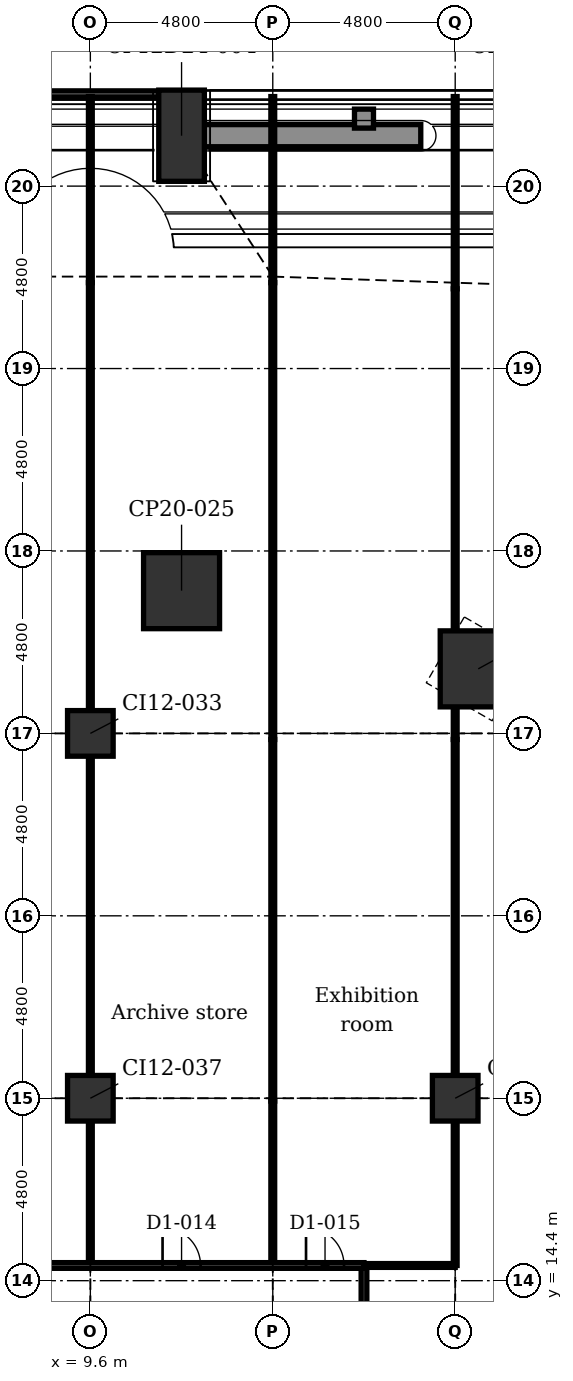
"""IFC4 building model, lengths in metres.
Left out: names, types, materials, properties, quantities, classifications, styles, units other than length and angle.
Written with IfcOpenShell. Run it as: python <this file> out.ifc"""

import sys

from ifc_helpers import new_model, si_unit, direction, frame, frame_2d, origin, origin_2d, place, context, subcontext, project, spatial, rectangle, extrude, element, fill, save


model = new_model("IFC4")
c1 = context("Model", 3, precision=1e-05, world=origin(), true_north=direction((0.0, 1.0)))
c2 = subcontext(c1, "Body", "Model", "MODEL_VIEW")
j1 = project(units=[si_unit("LENGTHUNIT", "METRE"), si_unit("PLANEANGLEUNIT", "RADIAN")], contexts=[c1])
p1 = place(None, origin())
s1 = spatial("IfcSite", under=j1, at=p1, CompositionType="ELEMENT")
p2 = place(p1, origin())
s2 = spatial("IfcBuilding", under=s1, at=p2, CompositionType="ELEMENT")
p3 = place(p2, frame((0.0, 0.0, 7.0)))
s3 = spatial("IfcBuildingStorey", under=s2, at=p3, CompositionType="ELEMENT", Elevation=7.0)
p4 = place(p3, frame((12.0, 44.526, -0.3), z_axis=(0.0, 0.0, 1.0), x_axis=(1.0, 0.0, 0.0)))
e1 = element("IfcColumn", 1, at=p4, inside=s3, PredefinedType="COLUMN", context=c2, shape_type="SweptSolid", body=[
    extrude(rectangle(XDim=1.2, YDim=2.4, at=origin_2d()), origin(), (0.0, 0.0, 1.0), 5.4),
])
for number, where, z_axis, x_axis in (
    (2, (12.0, 32.555, -0.3), (0.0, 0.0, 1.0), (1.0, 0.0, 0.0)),
    (3, (19.806, 30.498, -0.3), (0.0, 0.0, 1.0), (0.5, 0.866, 0.0)),
):
    element("IfcColumn", number, at=place(p3, frame(where, z_axis=z_axis, x_axis=x_axis)), inside=s3, PredefinedType="COLUMN", context=c2, shape_type="SweptSolid", body=[
        extrude(rectangle(XDim=2.0, YDim=2.0, at=origin_2d()), origin(), (0.0, 0.0, 1.0), 5.4),
    ])
for number, where, z_axis, x_axis in (
    (4, (9.6, 19.2, -0.3), (0.0, 0.0, 1.0), (1.0, 0.0, 0.0)),
    (5, (9.6, 28.8, -0.3), (0.0, 0.0, 1.0), (1.0, 0.0, 0.0)),
    (6, (19.2, 19.2, -0.3), (0.0, 0.0, 1.0), (1.0, 0.0, 0.0)),
):
    element("IfcColumn", number, at=place(p3, frame(where, z_axis=z_axis, x_axis=x_axis)), inside=s3, PredefinedType="COLUMN", context=c2, shape_type="SweptSolid", body=[
        extrude(rectangle(XDim=1.2, YDim=1.2, at=origin_2d()), origin(), (0.0, 0.0, 1.0), 5.4),
    ])
p5 = place(p3, frame((3.004, 45.626, 0.0), z_axis=(0.0, 0.0, 1.0), x_axis=(1.0, 0.0, 0.0)))
e7 = element("IfcWall", 7, at=p5, inside=s3, PredefinedType="PARTITIONING", context=c2, shape_type="SweptSolid", body=[
    extrude(rectangle(XDim=8.392, YDim=0.16, at=frame_2d((4.196, 0.0))), origin(), (0.0, 0.0, 1.0), 5.1),
])
p6 = place(p5, frame((2.996, 0.0, 0.0)))
e8 = element("IfcOpeningElement", 8, at=p6, cuts=e7, PredefinedType="OPENING", context=c2, shape_type="SweptSolid", body=[
    extrude(rectangle(XDim=2.4, YDim=2.4, at=frame_2d((1.2, 1.2))), frame((0.0, 0.09, 0.0), z_axis=(0.0, -1.0, 0.0), x_axis=(1.0, 0.0, 0.0)), (0.0, 0.0, 1.0), 0.18),
])
p7 = place(p3, frame((12.294, 44.526, 5.4), z_axis=(0.0, 0.0, 1.0), x_axis=(1.0, 0.0, 0.0)))
e9 = element("IfcWall", 9, at=p7, inside=s3, PredefinedType="USERDEFINED", context=c2, shape_type="SweptSolid", body=[
    extrude(rectangle(XDim=6.0, YDim=0.6, at=frame_2d((3.0, 0.0))), origin(), (0.0, 0.0, 1.0), 0.7),
])
p8 = place(p3, frame((16.55, 44.976, 0.0), z_axis=(0.0, 0.0, 1.0), x_axis=(1.0, 0.0, 0.0)))
e10 = element("IfcWall", 10, at=p8, inside=s3, PredefinedType="SOLIDWALL", context=c2, shape_type="SweptSolid", body=[
    extrude(rectangle(XDim=0.5, YDim=0.5, at=frame_2d((0.25, 0.0))), origin(), (0.0, 0.0, 1.0), 4.8),
])
p9 = place(p3, frame((19.2, 31.408, 0.0), z_axis=(0.0, 0.0, 1.0), x_axis=(0.0, 1.0, 0.0)))
e11 = element("IfcWall", 11, at=p9, inside=s3, PredefinedType="PARTITIONING", context=c2, shape_type="SweptSolid", body=[
    extrude(rectangle(XDim=9.09, YDim=0.1, at=frame_2d((4.545, 0.0))), origin(), (0.0, 0.0, 1.0), 4.643),
])
p10 = place(p3, frame((19.2, 14.8, 0.0), z_axis=(0.0, 0.0, 1.0), x_axis=(0.0, 1.0, 0.0)))
e12 = element("IfcWall", 12, at=p10, inside=s3, PredefinedType="PARTITIONING", context=c2, shape_type="SweptSolid", body=[
    extrude(rectangle(XDim=3.84, YDim=0.1, at=frame_2d((1.92, 0.0))), origin(), (0.0, 0.0, 1.0), 4.693),
])
p11 = place(p3, frame((19.2, 18.64, 0.0), z_axis=(0.0, 0.0, 1.0), x_axis=(0.0, 1.0, 0.0)))
e13 = element("IfcWall", 13, at=p11, inside=s3, PredefinedType="PARTITIONING", context=c2, shape_type="SweptSolid", body=[
    extrude(rectangle(XDim=1.12, YDim=0.1, at=frame_2d((0.56, 0.0))), origin(), (0.0, 0.0, 1.0), 5.1),
])
p12 = place(p3, frame((19.2, 19.76, 0.0), z_axis=(0.0, 0.0, 1.0), x_axis=(0.0, 1.0, 0.0)))
e14 = element("IfcWall", 14, at=p12, inside=s3, PredefinedType="PARTITIONING", context=c2, shape_type="SweptSolid", body=[
    extrude(rectangle(XDim=8.88, YDim=0.1, at=frame_2d((4.44, 0.0))), origin(), (0.0, 0.0, 1.0), 4.693),
])
p13 = place(p3, frame((19.2, 28.64, 0.0), z_axis=(0.0, 0.0, 1.0), x_axis=(0.0, 1.0, 0.0)))
e15 = element("IfcWall", 15, at=p13, inside=s3, PredefinedType="PARTITIONING", context=c2, shape_type="SweptSolid", body=[
    extrude(rectangle(XDim=2.769, YDim=0.1, at=frame_2d((1.384, 0.0))), origin(), (0.0, 0.0, 1.0), 5.1),
])
p14 = place(p3, frame((19.2, 40.498, 0.0), z_axis=(0.0, 0.0, 1.0), x_axis=(0.0, 1.0, 0.0)))
e16 = element("IfcWall", 16, at=p14, inside=s3, PredefinedType="PARTITIONING", context=c2, shape_type="SweptSolid", body=[
    extrude(rectangle(XDim=5.058, YDim=0.1, at=frame_2d((2.529, 0.0))), origin(), (0.0, 0.0, 1.0), 5.1),
])
p15 = place(p3, frame((16.8, 3.95, 0.0), z_axis=(0.0, 0.0, 1.0), x_axis=(0.0, 1.0, 0.0)))
e17 = element("IfcWall", 17, at=p15, inside=s3, PredefinedType="PARTITIONING", context=c2, shape_type="SweptSolid", body=[
    extrude(rectangle(XDim=10.85, YDim=0.15, at=frame_2d((5.425, 0.0))), origin(), (0.0, 0.0, 1.0), 5.1),
])
p16 = place(p15, frame((2.45, 0.0, 0.0)))
e18 = element("IfcOpeningElement", 18, at=p16, cuts=e17, PredefinedType="OPENING", context=c2, shape_type="SweptSolid", body=[
    extrude(rectangle(XDim=1.0, YDim=2.1, at=frame_2d((0.5, 1.05))), frame((0.0, 0.085, 0.0), z_axis=(0.0, -1.0, 0.0), x_axis=(1.0, 0.0, 0.0)), (0.0, 0.0, 1.0), 0.17),
])
p17 = place(p15, frame((7.95, 0.0, 0.0)))
e19 = element("IfcOpeningElement", 19, at=p17, cuts=e17, PredefinedType="OPENING", context=c2, shape_type="SweptSolid", body=[
    extrude(rectangle(XDim=1.0, YDim=2.1, at=frame_2d((0.5, 1.05))), frame((0.0, 0.085, 0.0), z_axis=(0.0, -1.0, 0.0), x_axis=(1.0, 0.0, 0.0)), (0.0, 0.0, 1.0), 0.17),
])
p18 = place(p3, frame((14.4, 28.64, 0.0), z_axis=(0.0, 0.0, 1.0), x_axis=(0.0, 1.0, 0.0)))
e20 = element("IfcWall", 20, at=p18, inside=s3, PredefinedType="PARTITIONING", context=c2, shape_type="SweptSolid", body=[
    extrude(rectangle(XDim=12.019, YDim=0.1, at=frame_2d((6.01, 0.0))), origin(), (0.0, 0.0, 1.0), 4.567),
])
p19 = place(p3, frame((14.4, 14.8, 0.0), z_axis=(0.0, 0.0, 1.0), x_axis=(0.0, 1.0, 0.0)))
e21 = element("IfcWall", 21, at=p19, inside=s3, PredefinedType="PARTITIONING", context=c2, shape_type="SweptSolid", body=[
    extrude(rectangle(XDim=4.326, YDim=0.1, at=frame_2d((2.163, 0.0))), origin(), (0.0, 0.0, 1.0), 4.693),
])
p20 = place(p3, frame((14.4, 19.126, 0.0), z_axis=(0.0, 0.0, 1.0), x_axis=(0.0, 1.0, 0.0)))
e22 = element("IfcWall", 22, at=p20, inside=s3, PredefinedType="PARTITIONING", context=c2, shape_type="SweptSolid", body=[
    extrude(rectangle(XDim=9.514, YDim=0.1, at=frame_2d((4.757, 0.0))), origin(), (0.0, 0.0, 1.0), 4.643),
])
p21 = place(p3, frame((14.4, 40.659, 0.0), z_axis=(0.0, 0.0, 1.0), x_axis=(0.0, 1.0, 0.0)))
e23 = element("IfcWall", 23, at=p21, inside=s3, PredefinedType="PARTITIONING", context=c2, shape_type="SweptSolid", body=[
    extrude(rectangle(XDim=4.897, YDim=0.1, at=frame_2d((2.448, 0.0))), origin(), (0.0, 0.0, 1.0), 5.1),
])
p22 = place(p3, frame((9.6, 29.36, 0.0), z_axis=(0.0, 0.0, 1.0), x_axis=(0.0, 1.0, 0.0)))
e24 = element("IfcWall", 24, at=p22, inside=s3, PredefinedType="PARTITIONING", context=c2, shape_type="SweptSolid", body=[
    extrude(rectangle(XDim=11.299, YDim=0.1, at=frame_2d((5.649, 0.0))), origin(), (0.0, 0.0, 1.0), 4.567),
])
p23 = place(p3, frame((9.6, 14.8, 0.0), z_axis=(0.0, 0.0, 1.0), x_axis=(0.0, 1.0, 0.0)))
e25 = element("IfcWall", 25, at=p23, inside=s3, PredefinedType="PARTITIONING", context=c2, shape_type="SweptSolid", body=[
    extrude(rectangle(XDim=3.84, YDim=0.1, at=frame_2d((1.92, 0.0))), origin(), (0.0, 0.0, 1.0), 4.693),
])
p24 = place(p3, frame((9.6, 18.64, 0.0), z_axis=(0.0, 0.0, 1.0), x_axis=(0.0, 1.0, 0.0)))
e26 = element("IfcWall", 26, at=p24, inside=s3, PredefinedType="PARTITIONING", context=c2, shape_type="SweptSolid", body=[
    extrude(rectangle(XDim=1.12, YDim=0.1, at=frame_2d((0.56, 0.0))), origin(), (0.0, 0.0, 1.0), 5.1),
])
p25 = place(p3, frame((9.6, 19.76, 0.0), z_axis=(0.0, 0.0, 1.0), x_axis=(0.0, 1.0, 0.0)))
e27 = element("IfcWall", 27, at=p25, inside=s3, PredefinedType="PARTITIONING", context=c2, shape_type="SweptSolid", body=[
    extrude(rectangle(XDim=8.48, YDim=0.1, at=frame_2d((4.24, 0.0))), origin(), (0.0, 0.0, 1.0), 4.693),
])
p26 = place(p3, frame((9.6, 28.24, 0.0), z_axis=(0.0, 0.0, 1.0), x_axis=(0.0, 1.0, 0.0)))
e28 = element("IfcWall", 28, at=p26, inside=s3, PredefinedType="PARTITIONING", context=c2, shape_type="SweptSolid", body=[
    extrude(rectangle(XDim=1.12, YDim=0.1, at=frame_2d((0.56, 0.0))), origin(), (0.0, 0.0, 1.0), 5.1),
])
p27 = place(p3, frame((9.6, 40.659, 0.0), z_axis=(0.0, 0.0, 1.0), x_axis=(0.0, 1.0, 0.0)))
e29 = element("IfcWall", 29, at=p27, inside=s3, PredefinedType="PARTITIONING", context=c2, shape_type="SweptSolid", body=[
    extrude(rectangle(XDim=4.897, YDim=0.1, at=frame_2d((2.448, 0.0))), origin(), (0.0, 0.0, 1.0), 5.1),
])
p28 = place(p3, frame((16.8, 14.8, 0.0), z_axis=(0.0, 0.0, 1.0), x_axis=(1.0, 0.0, 0.0)))
e30 = element("IfcWall", 30, at=p28, inside=s3, PredefinedType="PARTITIONING", context=c2, shape_type="SweptSolid", body=[
    extrude(rectangle(XDim=2.4, YDim=0.1, at=frame_2d((1.2, 0.0))), origin(), (0.0, 0.0, 1.0), 5.1),
])
p29 = place(p3, frame((-16.8, 14.8, 0.0), z_axis=(0.0, 0.0, 1.0), x_axis=(1.0, 0.0, 0.0)))
e31 = element("IfcWall", 31, at=p29, inside=s3, PredefinedType="PARTITIONING", context=c2, shape_type="SweptSolid", body=[
    extrude(rectangle(XDim=33.6, YDim=0.15, at=frame_2d((16.8, 0.0))), origin(), (0.0, 0.0, 1.0), 5.1),
])
p30 = place(p29, frame((15.75, 0.0, 0.0)))
e32 = element("IfcOpeningElement", 32, at=p30, cuts=e31, PredefinedType="OPENING", context=c2, shape_type="SweptSolid", body=[
    extrude(rectangle(XDim=0.9, YDim=2.1, at=frame_2d((0.45, 1.05))), frame((0.0, 0.085, 0.0), z_axis=(0.0, -1.0, 0.0), x_axis=(1.0, 0.0, 0.0)), (0.0, 0.0, 1.0), 0.17),
])
p31 = place(p29, frame((18.75, 0.0, 0.0)))
e33 = element("IfcOpeningElement", 33, at=p31, cuts=e31, PredefinedType="OPENING", context=c2, shape_type="SweptSolid", body=[
    extrude(rectangle(XDim=0.9, YDim=2.1, at=frame_2d((0.45, 1.05))), frame((0.0, 0.085, 0.0), z_axis=(0.0, -1.0, 0.0), x_axis=(1.0, 0.0, 0.0)), (0.0, 0.0, 1.0), 0.17),
])
p32 = place(p29, frame((3.375, 0.0, 0.0)))
e34 = element("IfcOpeningElement", 34, at=p32, cuts=e31, PredefinedType="OPENING", context=c2, shape_type="SweptSolid", body=[
    extrude(rectangle(XDim=1.8, YDim=2.1, at=frame_2d((0.9, 1.05))), frame((0.0, 0.085, 0.0), z_axis=(0.0, -1.0, 0.0), x_axis=(1.0, 0.0, 0.0)), (0.0, 0.0, 1.0), 0.17),
])
p33 = place(p29, frame((10.3, 0.0, 0.0)))
e35 = element("IfcOpeningElement", 35, at=p33, cuts=e31, PredefinedType="OPENING", context=c2, shape_type="SweptSolid", body=[
    extrude(rectangle(XDim=1.0, YDim=2.1, at=frame_2d((0.5, 1.05))), frame((0.0, 0.085, 0.0), z_axis=(0.0, -1.0, 0.0), x_axis=(1.0, 0.0, 0.0)), (0.0, 0.0, 1.0), 0.17),
])
p34 = place(p29, frame((23.325, 0.0, 0.0)))
e36 = element("IfcOpeningElement", 36, at=p34, cuts=e31, PredefinedType="OPENING", context=c2, shape_type="SweptSolid", body=[
    extrude(rectangle(XDim=1.8, YDim=2.1, at=frame_2d((0.9, 1.05))), frame((0.0, 0.085, 0.0), z_axis=(0.0, -1.0, 0.0), x_axis=(1.0, 0.0, 0.0)), (0.0, 0.0, 1.0), 0.17),
])
p35 = place(p29, frame((28.3, 0.0, 0.0)))
e37 = element("IfcOpeningElement", 37, at=p35, cuts=e31, PredefinedType="OPENING", context=c2, shape_type="SweptSolid", body=[
    extrude(rectangle(XDim=1.0, YDim=2.1, at=frame_2d((0.5, 1.05))), frame((0.0, 0.085, 0.0), z_axis=(0.0, -1.0, 0.0), x_axis=(1.0, 0.0, 0.0)), (0.0, 0.0, 1.0), 0.17),
])
p36 = place(p29, frame((32.075, 0.0, 0.0)))
e38 = element("IfcOpeningElement", 38, at=p36, cuts=e31, PredefinedType="OPENING", context=c2, shape_type="SweptSolid", body=[
    extrude(rectangle(XDim=1.0, YDim=2.1, at=frame_2d((0.5, 1.05))), frame((0.0, 0.085, 0.0), z_axis=(0.0, -1.0, 0.0), x_axis=(1.0, 0.0, 0.0)), (0.0, 0.0, 1.0), 0.17),
])
p37 = place(p35, origin())
e39 = element("IfcDoor", 39, at=p37, inside=s3, OperationType="SINGLE_SWING_LEFT", PredefinedType="DOOR", context=c2, shape_type="SweptSolid", body=[
    extrude(rectangle(XDim=1.0, YDim=2.1, at=frame_2d((0.5, 1.05))), frame((0.0, 0.025, 0.0), z_axis=(0.0, -1.0, 0.0), x_axis=(1.0, 0.0, 0.0)), (0.0, 0.0, 1.0), 0.05),
])
fill(e37, e39)
p38 = place(p36, origin())
e40 = element("IfcDoor", 40, at=p38, inside=s3, OperationType="SINGLE_SWING_LEFT", PredefinedType="DOOR", context=c2, shape_type="SweptSolid", body=[
    extrude(rectangle(XDim=1.0, YDim=2.1, at=frame_2d((0.5, 1.05))), frame((0.0, 0.025, 0.0), z_axis=(0.0, -1.0, 0.0), x_axis=(1.0, 0.0, 0.0)), (0.0, 0.0, 1.0), 0.05),
])
fill(e38, e40)
save(model, sys.argv[1])
